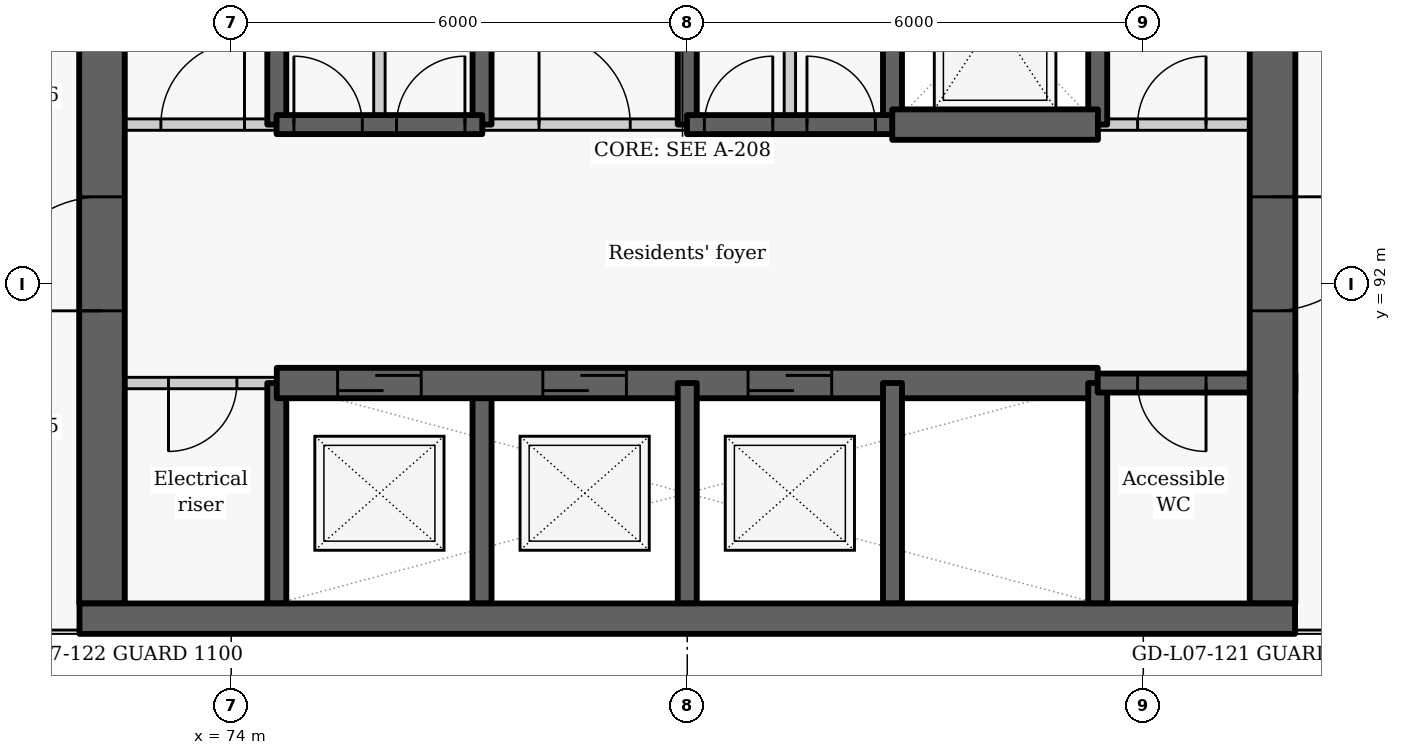
"""IFC4 building model, lengths in metres.
Left out: names, types, materials, properties, quantities, classifications, styles, units other than length and angle.
Written with IfcOpenShell. Run it as: python <this file> out.ifc"""

import sys

from ifc_helpers import new_model, si_unit, direction, frame, frame_2d, origin, place, context, subcontext, project, spatial, rectangle, extrude, element, fill, save


model = new_model("IFC4")
c1 = context("Model", 3, precision=1e-05, world=origin(), true_north=direction((0.0, 1.0)))
c2 = subcontext(c1, "Body", "Model", "MODEL_VIEW")
j1 = project(units=[si_unit("LENGTHUNIT", "METRE"), si_unit("PLANEANGLEUNIT", "RADIAN")], contexts=[c1])
p1 = place(None, origin())
s1 = spatial("IfcSite", under=j1, at=p1, CompositionType="ELEMENT")
p2 = place(p1, origin())
s2 = spatial("IfcBuilding", under=s1, at=p2, CompositionType="ELEMENT")
p3 = place(p2, frame((0.0, 0.0, 31.5)))
s3 = spatial("IfcBuildingStorey", under=s2, at=p3, CompositionType="ELEMENT", Elevation=31.5)
p4 = place(p3, frame((74.6, 87.8, -0.275), z_axis=(0.0, 0.0, 1.0), x_axis=(0.0, 1.0, 0.0)))
e1 = element("IfcWall", 1, at=p4, inside=s3, PredefinedType="SHEAR", context=c2, shape_type="SweptSolid", body=[
    extrude(rectangle(XDim=2.9, YDim=0.25, at=frame_2d((1.45, 0.0))), origin(), (0.0, 0.0, 1.0), 3.3),
])
p5 = place(p3, frame((74.6, 94.1, -0.275), z_axis=(0.0, 0.0, 1.0), x_axis=(0.0, 1.0, 0.0)))
e2 = element("IfcWall", 2, at=p5, inside=s3, PredefinedType="SHEAR", context=c2, shape_type="SweptSolid", body=[
    extrude(rectangle(XDim=2.8, YDim=0.25, at=frame_2d((1.4, 0.0))), origin(), (0.0, 0.0, 1.0), 3.3),
])
p6 = place(p3, frame((74.6, 90.7, 0.0), z_axis=(0.0, 0.0, 1.0), x_axis=(-1.0, 0.0, 0.0)))
e3 = element("IfcWall", 3, at=p6, inside=s3, PredefinedType="PARTITIONING", context=c2, shape_type="SweptSolid", body=[
    extrude(rectangle(XDim=2.6, YDim=0.15, at=frame_2d((1.3, 0.0))), origin(), (0.0, 0.0, 1.0), 3.025),
])
p7 = place(p6, frame((0.525, 0.0, 0.0)))
e4 = element("IfcOpeningElement", 4, at=p7, cuts=e3, PredefinedType="OPENING", context=c2, shape_type="SweptSolid", body=[
    extrude(rectangle(XDim=0.9, YDim=2.1, at=frame_2d((0.45, 1.05))), frame((0.0, 0.085, 0.0), z_axis=(0.0, -1.0, 0.0), x_axis=(1.0, 0.0, 0.0)), (0.0, 0.0, 1.0), 0.17),
])
p8 = place(p3, frame((72.3, 87.8, -0.275), z_axis=(0.0, 0.0, 1.0), x_axis=(0.0, 1.0, 0.0)))
e5 = element("IfcWall", 5, at=p8, inside=s3, PredefinedType="SHEAR", context=c2, shape_type="SweptSolid", body=[
    extrude(rectangle(XDim=9.1, YDim=0.6, at=frame_2d((4.55, 0.0))), origin(), (0.0, 0.0, 1.0), 3.3),
])
p9 = place(p8, frame((3.85, 0.0, 0.275)))
e6 = element("IfcOpeningElement", 6, at=p9, cuts=e5, PredefinedType="OPENING", context=c2, shape_type="SweptSolid", body=[
    extrude(rectangle(XDim=1.5, YDim=2.1, at=frame_2d((0.75, 1.05))), frame((0.0, 0.31, 0.0), z_axis=(0.0, -1.0, 0.0), x_axis=(1.0, 0.0, 0.0)), (0.0, 0.0, 1.0), 0.62),
])
p10 = place(p3, frame((77.3, 87.8, -0.275), z_axis=(0.0, 0.0, 1.0), x_axis=(0.0, 1.0, 0.0)))
e7 = element("IfcWall", 7, at=p10, inside=s3, PredefinedType="SHEAR", context=c2, shape_type="SweptSolid", body=[
    extrude(rectangle(XDim=2.9, YDim=0.25, at=frame_2d((1.45, 0.0))), origin(), (0.0, 0.0, 1.0), 3.3),
])
p11 = place(p3, frame((77.3, 94.1, -0.275), z_axis=(0.0, 0.0, 1.0), x_axis=(0.0, 1.0, 0.0)))
e8 = element("IfcWall", 8, at=p11, inside=s3, PredefinedType="SHEAR", context=c2, shape_type="SweptSolid", body=[
    extrude(rectangle(XDim=2.8, YDim=0.25, at=frame_2d((1.4, 0.0))), origin(), (0.0, 0.0, 1.0), 3.3),
])
p12 = place(p3, frame((74.6, 90.7, -0.275), z_axis=(0.0, 0.0, 1.0), x_axis=(1.0, 0.0, 0.0)))
e9 = element("IfcWall", 9, at=p12, inside=s3, PredefinedType="SHEAR", context=c2, shape_type="SweptSolid", body=[
    extrude(rectangle(XDim=10.8, YDim=0.4, at=frame_2d((5.4, 0.0))), origin(), (0.0, 0.0, 1.0), 3.3),
])
p13 = place(p12, frame((0.8, 0.0, 0.275)))
e10 = element("IfcOpeningElement", 10, at=p13, cuts=e9, PredefinedType="OPENING", context=c2, shape_type="SweptSolid", body=[
    extrude(rectangle(XDim=1.1, YDim=2.1, at=frame_2d((0.55, 1.05))), frame((0.0, 0.21, 0.0), z_axis=(0.0, -1.0, 0.0), x_axis=(1.0, 0.0, 0.0)), (0.0, 0.0, 1.0), 0.42),
])
p14 = place(p12, frame((3.5, 0.0, 0.275)))
e11 = element("IfcOpeningElement", 11, at=p14, cuts=e9, PredefinedType="OPENING", context=c2, shape_type="SweptSolid", body=[
    extrude(rectangle(XDim=1.1, YDim=2.1, at=frame_2d((0.55, 1.05))), frame((0.0, 0.21, 0.0), z_axis=(0.0, -1.0, 0.0), x_axis=(1.0, 0.0, 0.0)), (0.0, 0.0, 1.0), 0.42),
])
p15 = place(p12, frame((6.2, 0.0, 0.275)))
e12 = element("IfcOpeningElement", 12, at=p15, cuts=e9, PredefinedType="OPENING", context=c2, shape_type="SweptSolid", body=[
    extrude(rectangle(XDim=1.1, YDim=2.1, at=frame_2d((0.55, 1.05))), frame((0.0, 0.21, 0.0), z_axis=(0.0, -1.0, 0.0), x_axis=(1.0, 0.0, 0.0)), (0.0, 0.0, 1.0), 0.42),
])
p16 = place(p3, frame((80.0, 87.8, -0.275), z_axis=(0.0, 0.0, 1.0), x_axis=(0.0, 1.0, 0.0)))
e13 = element("IfcWall", 13, at=p16, inside=s3, PredefinedType="SHEAR", context=c2, shape_type="SweptSolid", body=[
    extrude(rectangle(XDim=2.9, YDim=0.25, at=frame_2d((1.45, 0.0))), origin(), (0.0, 0.0, 1.0), 3.3),
])
p17 = place(p3, frame((80.0, 94.1, -0.275), z_axis=(0.0, 0.0, 1.0), x_axis=(0.0, 1.0, 0.0)))
e14 = element("IfcWall", 14, at=p17, inside=s3, PredefinedType="SHEAR", context=c2, shape_type="SweptSolid", body=[
    extrude(rectangle(XDim=2.8, YDim=0.25, at=frame_2d((1.4, 0.0))), origin(), (0.0, 0.0, 1.0), 3.3),
])
p18 = place(p3, frame((82.7, 87.8, -0.275), z_axis=(0.0, 0.0, 1.0), x_axis=(0.0, 1.0, 0.0)))
e15 = element("IfcWall", 15, at=p18, inside=s3, PredefinedType="SHEAR", context=c2, shape_type="SweptSolid", body=[
    extrude(rectangle(XDim=2.9, YDim=0.25, at=frame_2d((1.45, 0.0))), origin(), (0.0, 0.0, 1.0), 3.3),
])
p19 = place(p3, frame((82.7, 94.1, -0.275), z_axis=(0.0, 0.0, 1.0), x_axis=(0.0, 1.0, 0.0)))
e16 = element("IfcWall", 16, at=p19, inside=s3, PredefinedType="SHEAR", context=c2, shape_type="SweptSolid", body=[
    extrude(rectangle(XDim=2.8, YDim=0.25, at=frame_2d((1.4, 0.0))), origin(), (0.0, 0.0, 1.0), 3.3),
])
p20 = place(p3, frame((85.4, 87.8, -0.275), z_axis=(0.0, 0.0, 1.0), x_axis=(0.0, 1.0, 0.0)))
e17 = element("IfcWall", 17, at=p20, inside=s3, PredefinedType="SHEAR", context=c2, shape_type="SweptSolid", body=[
    extrude(rectangle(XDim=2.9, YDim=0.25, at=frame_2d((1.45, 0.0))), origin(), (0.0, 0.0, 1.0), 3.3),
])
p21 = place(p3, frame((85.4, 94.1, -0.275), z_axis=(0.0, 0.0, 1.0), x_axis=(0.0, 1.0, 0.0)))
e18 = element("IfcWall", 18, at=p21, inside=s3, PredefinedType="SHEAR", context=c2, shape_type="SweptSolid", body=[
    extrude(rectangle(XDim=2.8, YDim=0.25, at=frame_2d((1.4, 0.0))), origin(), (0.0, 0.0, 1.0), 3.3),
])
p22 = place(p3, frame((88.0, 90.7, -0.275), z_axis=(0.0, 0.0, 1.0), x_axis=(-1.0, 0.0, 0.0)))
e19 = element("IfcWall", 19, at=p22, inside=s3, PredefinedType="SHEAR", context=c2, shape_type="SweptSolid", body=[
    extrude(rectangle(XDim=2.6, YDim=0.25, at=frame_2d((1.3, 0.0))), origin(), (0.0, 0.0, 1.0), 3.3),
])
p23 = place(p22, frame((1.175, 0.0, 0.275)))
e20 = element("IfcOpeningElement", 20, at=p23, cuts=e19, PredefinedType="OPENING", context=c2, shape_type="SweptSolid", body=[
    extrude(rectangle(XDim=0.9, YDim=2.1, at=frame_2d((0.45, 1.05))), frame((0.0, 0.135, 0.0), z_axis=(0.0, -1.0, 0.0), x_axis=(1.0, 0.0, 0.0)), (0.0, 0.0, 1.0), 0.27),
])
p24 = place(p3, frame((87.7, 103.4, -0.275), z_axis=(0.0, 0.0, 1.0), x_axis=(0.0, -1.0, 0.0)))
e21 = element("IfcWall", 21, at=p24, inside=s3, PredefinedType="SHEAR", context=c2, shape_type="SweptSolid", body=[
    extrude(rectangle(XDim=15.6, YDim=0.6, at=frame_2d((7.8, 0.0))), origin(), (0.0, 0.0, 1.0), 3.3),
])
p25 = place(p24, frame((10.25, 0.0, 0.275)))
e22 = element("IfcOpeningElement", 22, at=p25, cuts=e21, PredefinedType="OPENING", context=c2, shape_type="SweptSolid", body=[
    extrude(rectangle(XDim=1.5, YDim=2.1, at=frame_2d((0.75, 1.05))), frame((0.0, 0.31, 0.0), z_axis=(0.0, -1.0, 0.0), x_axis=(1.0, 0.0, 0.0)), (0.0, 0.0, 1.0), 0.62),
])
p26 = place(p24, frame((2.7, 0.0, 0.275)))
e23 = element("IfcOpeningElement", 23, at=p26, cuts=e21, PredefinedType="OPENING", context=c2, shape_type="SweptSolid", body=[
    extrude(rectangle(XDim=1.1, YDim=2.1, at=frame_2d((0.55, 1.05))), frame((0.0, 0.31, 0.0), z_axis=(0.0, -1.0, 0.0), x_axis=(1.0, 0.0, 0.0)), (0.0, 0.0, 1.0), 0.62),
])
p27 = place(p3, frame((72.0, 94.1, 0.0), z_axis=(0.0, 0.0, 1.0), x_axis=(1.0, 0.0, 0.0)))
e24 = element("IfcWall", 24, at=p27, inside=s3, PredefinedType="PARTITIONING", context=c2, shape_type="SweptSolid", body=[
    extrude(rectangle(XDim=2.603, YDim=0.15, at=frame_2d((1.302, 0.0))), origin(), (0.0, 0.0, 1.0), 3.025),
])
p28 = place(p27, frame((1.075, 0.0, 0.0)))
e25 = element("IfcOpeningElement", 25, at=p28, cuts=e24, PredefinedType="OPENING", context=c2, shape_type="SweptSolid", body=[
    extrude(rectangle(XDim=1.1, YDim=2.1, at=frame_2d((0.55, 1.05))), frame((0.0, 0.085, 0.0), z_axis=(0.0, -1.0, 0.0), x_axis=(1.0, 0.0, 0.0)), (0.0, 0.0, 1.0), 0.17),
])
p29 = place(p3, frame((77.297, 94.1, 0.0), z_axis=(0.0, 0.0, 1.0), x_axis=(1.0, 0.0, 0.0)))
e26 = element("IfcWall", 26, at=p29, inside=s3, PredefinedType="PARTITIONING", context=c2, shape_type="SweptSolid", body=[
    extrude(rectangle(XDim=2.706, YDim=0.15, at=frame_2d((1.353, 0.0))), origin(), (0.0, 0.0, 1.0), 3.025),
])
p30 = place(p29, frame((0.753, 0.0, 0.0)))
e27 = element("IfcOpeningElement", 27, at=p30, cuts=e26, PredefinedType="OPENING", context=c2, shape_type="SweptSolid", body=[
    extrude(rectangle(XDim=1.2, YDim=2.1, at=frame_2d((0.6, 1.05))), frame((0.0, 0.085, 0.0), z_axis=(0.0, -1.0, 0.0), x_axis=(1.0, 0.0, 0.0)), (0.0, 0.0, 1.0), 0.17),
])
p31 = place(p3, frame((85.397, 94.1, 0.0), z_axis=(0.0, 0.0, 1.0), x_axis=(1.0, 0.0, 0.0)))
e28 = element("IfcWall", 28, at=p31, inside=s3, PredefinedType="PARTITIONING", context=c2, shape_type="SweptSolid", body=[
    extrude(rectangle(XDim=2.603, YDim=0.15, at=frame_2d((1.302, 0.0))), origin(), (0.0, 0.0, 1.0), 3.025),
])
p32 = place(p31, frame((0.528, 0.0, 0.0)))
e29 = element("IfcOpeningElement", 29, at=p32, cuts=e28, PredefinedType="OPENING", context=c2, shape_type="SweptSolid", body=[
    extrude(rectangle(XDim=0.9, YDim=2.1, at=frame_2d((0.45, 1.05))), frame((0.0, 0.085, 0.0), z_axis=(0.0, -1.0, 0.0), x_axis=(1.0, 0.0, 0.0)), (0.0, 0.0, 1.0), 0.17),
])
p33 = place(p3, frame((74.597, 94.1, -0.275), z_axis=(0.0, 0.0, 1.0), x_axis=(1.0, 0.0, 0.0)))
e30 = element("IfcWall", 30, at=p33, inside=s3, PredefinedType="SHEAR", context=c2, shape_type="SweptSolid", body=[
    extrude(rectangle(XDim=2.706, YDim=0.25, at=frame_2d((1.353, 0.0))), origin(), (0.0, 0.0, 1.0), 3.3),
])
p34 = place(p33, frame((0.228, 0.0, 0.275)))
e31 = element("IfcOpeningElement", 31, at=p34, cuts=e30, PredefinedType="OPENING", context=c2, shape_type="SweptSolid", body=[
    extrude(rectangle(XDim=0.9, YDim=2.1, at=frame_2d((0.45, 1.05))), frame((0.0, 0.135, 0.0), z_axis=(0.0, -1.0, 0.0), x_axis=(1.0, 0.0, 0.0)), (0.0, 0.0, 1.0), 0.27),
])
p35 = place(p33, frame((1.578, 0.0, 0.275)))
e32 = element("IfcOpeningElement", 32, at=p35, cuts=e30, PredefinedType="OPENING", context=c2, shape_type="SweptSolid", body=[
    extrude(rectangle(XDim=0.9, YDim=2.1, at=frame_2d((0.45, 1.05))), frame((0.0, 0.135, 0.0), z_axis=(0.0, -1.0, 0.0), x_axis=(1.0, 0.0, 0.0)), (0.0, 0.0, 1.0), 0.27),
])
p36 = place(p3, frame((79.997, 94.1, -0.275), z_axis=(0.0, 0.0, 1.0), x_axis=(1.0, 0.0, 0.0)))
e33 = element("IfcWall", 33, at=p36, inside=s3, PredefinedType="SHEAR", context=c2, shape_type="SweptSolid", body=[
    extrude(rectangle(XDim=2.706, YDim=0.25, at=frame_2d((1.353, 0.0))), origin(), (0.0, 0.0, 1.0), 3.3),
])
p37 = place(p36, frame((0.228, 0.0, 0.275)))
e34 = element("IfcOpeningElement", 34, at=p37, cuts=e33, PredefinedType="OPENING", context=c2, shape_type="SweptSolid", body=[
    extrude(rectangle(XDim=0.9, YDim=2.1, at=frame_2d((0.45, 1.05))), frame((0.0, 0.135, 0.0), z_axis=(0.0, -1.0, 0.0), x_axis=(1.0, 0.0, 0.0)), (0.0, 0.0, 1.0), 0.27),
])
p38 = place(p36, frame((1.578, 0.0, 0.275)))
e35 = element("IfcOpeningElement", 35, at=p38, cuts=e33, PredefinedType="OPENING", context=c2, shape_type="SweptSolid", body=[
    extrude(rectangle(XDim=0.9, YDim=2.1, at=frame_2d((0.45, 1.05))), frame((0.0, 0.135, 0.0), z_axis=(0.0, -1.0, 0.0), x_axis=(1.0, 0.0, 0.0)), (0.0, 0.0, 1.0), 0.27),
])
p39 = place(p3, frame((82.697, 94.1, -0.275), z_axis=(0.0, 0.0, 1.0), x_axis=(1.0, 0.0, 0.0)))
e36 = element("IfcWall", 36, at=p39, inside=s3, PredefinedType="SHEAR", context=c2, shape_type="SweptSolid", body=[
    extrude(rectangle(XDim=2.706, YDim=0.4, at=frame_2d((1.353, 0.0))), origin(), (0.0, 0.0, 1.0), 3.3),
])
for number, where, z_axis, x_axis in (
    (37, (75.95, 94.1, 0.0), (0.0, 0.0, 1.0), (0.0, 1.0, 0.0)),
    (38, (81.35, 94.1, 0.0), (0.0, 0.0, 1.0), (0.0, 1.0, 0.0)),
):
    element("IfcWall", number, at=place(p3, frame(where, z_axis=z_axis, x_axis=x_axis)), inside=s3, PredefinedType="PARTITIONING", context=c2, shape_type="SweptSolid", body=[
        extrude(rectangle(XDim=2.8, YDim=0.15, at=frame_2d((1.4, 0.0))), origin(), (0.0, 0.0, 1.0), 3.025),
    ])
p40 = place(p3, frame((72.004, 87.6, -0.275), z_axis=(0.0, 0.0, 1.0), x_axis=(1.0, 0.0, 0.0)))
e39 = element("IfcWall", 39, at=p40, inside=s3, PredefinedType="SHEAR", context=c2, shape_type="SweptSolid", body=[
    extrude(rectangle(XDim=15.992, YDim=0.4, at=frame_2d((7.996, 0.0))), origin(), (0.0, 0.0, 1.0), 3.3),
])
p41 = place(p7, origin())
e40 = element("IfcDoor", 40, at=p41, inside=s3, OperationType="SINGLE_SWING_RIGHT", PredefinedType="DOOR", context=c2, shape_type="SweptSolid", body=[
    extrude(rectangle(XDim=0.9, YDim=2.1, at=frame_2d((0.45, 1.05))), frame((0.0, 0.025, 0.0), z_axis=(0.0, -1.0, 0.0), x_axis=(1.0, 0.0, 0.0)), (0.0, 0.0, 1.0), 0.05),
])
fill(e4, e40)
p42 = place(p13, origin())
e41 = element("IfcDoor", 41, at=p42, inside=s3, OperationType="SLIDING_TO_LEFT", PredefinedType="DOOR", context=c2, shape_type="SweptSolid", body=[
    extrude(rectangle(XDim=1.1, YDim=2.1, at=frame_2d((0.55, 1.05))), frame((0.0, 0.025, 0.0), z_axis=(0.0, -1.0, 0.0), x_axis=(1.0, 0.0, 0.0)), (0.0, 0.0, 1.0), 0.05),
])
fill(e10, e41)
p43 = place(p14, origin())
e42 = element("IfcDoor", 42, at=p43, inside=s3, OperationType="SLIDING_TO_LEFT", PredefinedType="DOOR", context=c2, shape_type="SweptSolid", body=[
    extrude(rectangle(XDim=1.1, YDim=2.1, at=frame_2d((0.55, 1.05))), frame((0.0, 0.025, 0.0), z_axis=(0.0, -1.0, 0.0), x_axis=(1.0, 0.0, 0.0)), (0.0, 0.0, 1.0), 0.05),
])
fill(e11, e42)
p44 = place(p15, origin())
e43 = element("IfcDoor", 43, at=p44, inside=s3, OperationType="SLIDING_TO_LEFT", PredefinedType="DOOR", context=c2, shape_type="SweptSolid", body=[
    extrude(rectangle(XDim=1.1, YDim=2.1, at=frame_2d((0.55, 1.05))), frame((0.0, 0.025, 0.0), z_axis=(0.0, -1.0, 0.0), x_axis=(1.0, 0.0, 0.0)), (0.0, 0.0, 1.0), 0.05),
])
fill(e12, e43)
p45 = place(p23, origin())
e44 = element("IfcDoor", 44, at=p45, inside=s3, OperationType="SINGLE_SWING_LEFT", PredefinedType="DOOR", context=c2, shape_type="SweptSolid", body=[
    extrude(rectangle(XDim=0.9, YDim=2.1, at=frame_2d((0.45, 1.05))), frame((0.0, 0.025, 0.0), z_axis=(0.0, -1.0, 0.0), x_axis=(1.0, 0.0, 0.0)), (0.0, 0.0, 1.0), 0.05),
])
fill(e20, e44)
p46 = place(p28, origin())
e45 = element("IfcDoor", 45, at=p46, inside=s3, OperationType="SINGLE_SWING_RIGHT", PredefinedType="DOOR", context=c2, shape_type="SweptSolid", body=[
    extrude(rectangle(XDim=1.1, YDim=2.1, at=frame_2d((0.55, 1.05))), frame((0.0, 0.025, 0.0), z_axis=(0.0, -1.0, 0.0), x_axis=(1.0, 0.0, 0.0)), (0.0, 0.0, 1.0), 0.05),
])
fill(e25, e45)
p47 = place(p34, origin())
e46 = element("IfcDoor", 46, at=p47, inside=s3, OperationType="SINGLE_SWING_LEFT", PredefinedType="DOOR", context=c2, shape_type="SweptSolid", body=[
    extrude(rectangle(XDim=0.9, YDim=2.1, at=frame_2d((0.45, 1.05))), frame((0.0, 0.025, 0.0), z_axis=(0.0, -1.0, 0.0), x_axis=(1.0, 0.0, 0.0)), (0.0, 0.0, 1.0), 0.05),
])
fill(e31, e46)
p48 = place(p35, origin())
e47 = element("IfcDoor", 47, at=p48, inside=s3, OperationType="SINGLE_SWING_RIGHT", PredefinedType="DOOR", context=c2, shape_type="SweptSolid", body=[
    extrude(rectangle(XDim=0.9, YDim=2.1, at=frame_2d((0.45, 1.05))), frame((0.0, 0.025, 0.0), z_axis=(0.0, -1.0, 0.0), x_axis=(1.0, 0.0, 0.0)), (0.0, 0.0, 1.0), 0.05),
])
fill(e32, e47)
p49 = place(p30, origin())
e48 = element("IfcDoor", 48, at=p49, inside=s3, OperationType="DOUBLE_DOOR_SINGLE_SWING", PredefinedType="DOOR", context=c2, shape_type="SweptSolid", body=[
    extrude(rectangle(XDim=1.2, YDim=2.1, at=frame_2d((0.6, 1.05))), frame((0.0, 0.025, 0.0), z_axis=(0.0, -1.0, 0.0), x_axis=(1.0, 0.0, 0.0)), (0.0, 0.0, 1.0), 0.05),
])
fill(e27, e48)
p50 = place(p37, origin())
e49 = element("IfcDoor", 49, at=p50, inside=s3, OperationType="SINGLE_SWING_RIGHT", PredefinedType="DOOR", context=c2, shape_type="SweptSolid", body=[
    extrude(rectangle(XDim=0.9, YDim=2.1, at=frame_2d((0.45, 1.05))), frame((0.0, 0.025, 0.0), z_axis=(0.0, -1.0, 0.0), x_axis=(1.0, 0.0, 0.0)), (0.0, 0.0, 1.0), 0.05),
])
fill(e34, e49)
p51 = place(p38, origin())
e50 = element("IfcDoor", 50, at=p51, inside=s3, OperationType="SINGLE_SWING_LEFT", PredefinedType="DOOR", context=c2, shape_type="SweptSolid", body=[
    extrude(rectangle(XDim=0.9, YDim=2.1, at=frame_2d((0.45, 1.05))), frame((0.0, 0.025, 0.0), z_axis=(0.0, -1.0, 0.0), x_axis=(1.0, 0.0, 0.0)), (0.0, 0.0, 1.0), 0.05),
])
fill(e35, e50)
p52 = place(p32, origin())
e51 = element("IfcDoor", 51, at=p52, inside=s3, OperationType="SINGLE_SWING_RIGHT", PredefinedType="DOOR", context=c2, shape_type="SweptSolid", body=[
    extrude(rectangle(XDim=0.9, YDim=2.1, at=frame_2d((0.45, 1.05))), frame((0.0, 0.025, 0.0), z_axis=(0.0, -1.0, 0.0), x_axis=(1.0, 0.0, 0.0)), (0.0, 0.0, 1.0), 0.05),
])
fill(e29, e51)
p53 = place(p25, origin())
e52 = element("IfcDoor", 52, at=p53, inside=s3, OperationType="DOUBLE_DOOR_SINGLE_SWING", PredefinedType="DOOR", context=c2, shape_type="SweptSolid", body=[
    extrude(rectangle(XDim=1.5, YDim=2.1, at=frame_2d((0.75, 1.05))), frame((0.0, 0.025, 0.0), z_axis=(0.0, -1.0, 0.0), x_axis=(1.0, 0.0, 0.0)), (0.0, 0.0, 1.0), 0.05),
])
fill(e22, e52)
p54 = place(p9, origin())
e53 = element("IfcDoor", 53, at=p54, inside=s3, OperationType="DOUBLE_DOOR_SINGLE_SWING", PredefinedType="DOOR", context=c2, shape_type="SweptSolid", body=[
    extrude(rectangle(XDim=1.5, YDim=2.1, at=frame_2d((0.75, 1.05))), frame((0.0, 0.025, 0.0), z_axis=(0.0, -1.0, 0.0), x_axis=(1.0, 0.0, 0.0)), (0.0, 0.0, 1.0), 0.05),
])
fill(e6, e53)
save(model, sys.argv[1])
